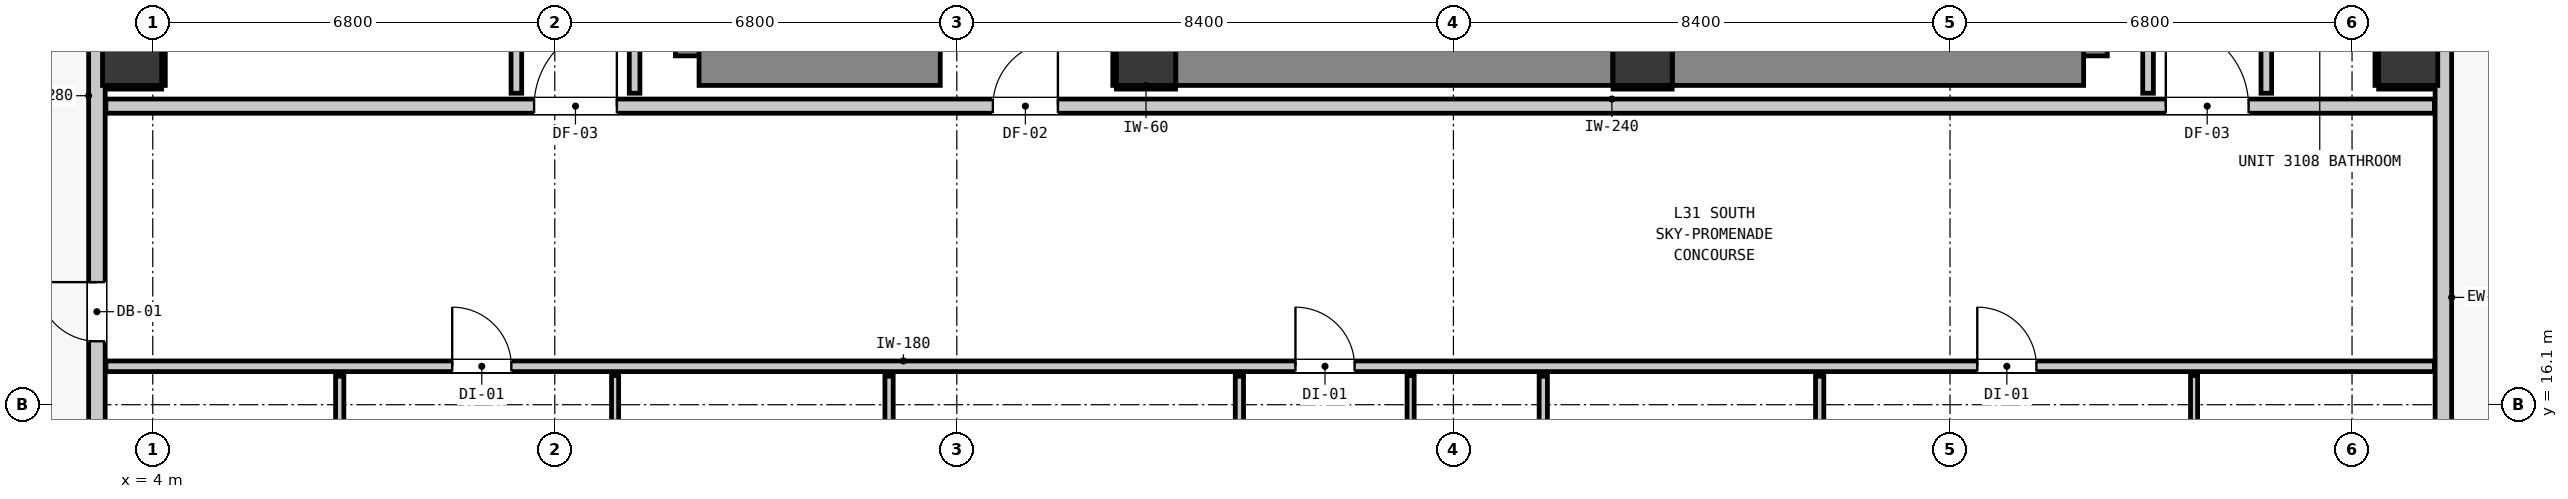
"""IFC4 building model, lengths in metres.
Left out: names, types, materials, properties, quantities, classifications, styles, units other than length and angle.
Written with IfcOpenShell. Run it as: python <this file> out.ifc"""

import sys

from ifc_helpers import new_model, si_unit, direction, frame, frame_2d, origin, origin_2d, place, context, subcontext, project, spatial, rectangle, extrude, element, fill, save


model = new_model("IFC4")
c1 = context("Model", 3, precision=1e-05, world=origin(), true_north=direction((0.0, 1.0)))
c2 = subcontext(c1, "Body", "Model", "MODEL_VIEW")
j1 = project(units=[si_unit("LENGTHUNIT", "METRE"), si_unit("PLANEANGLEUNIT", "RADIAN")], contexts=[c1])
p1 = place(None, origin())
s1 = spatial("IfcSite", under=j1, at=p1, CompositionType="ELEMENT")
p2 = place(p1, origin())
s2 = spatial("IfcBuilding", under=s1, at=p2, CompositionType="ELEMENT")
p3 = place(p2, frame((0.0, 0.0, 109.4)))
s3 = spatial("IfcBuildingStorey", under=s2, at=p3, CompositionType="ELEMENT", Elevation=109.4)
for number, where, z_axis, x_axis in (
    (1, (20.8, 22.0, 0.0), (0.0, 0.0, 1.0), (1.0, 0.0, 0.0)),
    (2, (29.2, 22.0, 0.0), (0.0, 0.0, 1.0), (1.0, 0.0, 0.0)),
):
    element("IfcColumn", number, at=place(p3, frame(where, z_axis=z_axis, x_axis=x_axis)), inside=s3, PredefinedType="COLUMN", context=c2, shape_type="SweptSolid", body=[
        extrude(rectangle(XDim=1.0, YDim=1.0, at=origin_2d()), origin(), (0.0, 0.0, 1.0), 3.32),
    ])
p4 = place(p3, frame((13.34, 22.0, 0.0), z_axis=(0.0, 0.0, 1.0), x_axis=(0.0, 1.0, 0.0)))
e3 = element("IfcWall", 3, at=p4, inside=s3, PredefinedType="SHEAR", context=c2, shape_type="SweptSolid", body=[
    extrude(rectangle(XDim=8.195, YDim=1.0, at=frame_2d((4.098, 0.0))), origin(), (0.0, 0.0, 1.0), 3.32),
])
p5 = place(p3, frame((13.24, 22.0, 0.0), z_axis=(0.0, 0.0, 1.0), x_axis=(1.0, 0.0, 0.0)))
e4 = element("IfcWall", 4, at=p5, inside=s3, PredefinedType="SHEAR", context=c2, shape_type="SweptSolid", body=[
    extrude(rectangle(XDim=4.08, YDim=1.0, at=frame_2d((2.04, 0.0))), origin(), (0.0, 0.0, 1.0), 3.32),
])
p6 = place(p3, frame((36.56, 22.0, 0.0), z_axis=(0.0, 0.0, 1.0), x_axis=(0.0, 1.0, 0.0)))
e5 = element("IfcWall", 5, at=p6, inside=s3, PredefinedType="SHEAR", context=c2, shape_type="SweptSolid", body=[
    extrude(rectangle(XDim=8.195, YDim=1.0, at=frame_2d((4.098, 0.0))), origin(), (0.0, 0.0, 1.0), 3.32),
])
p7 = place(p3, frame((29.705, 22.0, 0.0), z_axis=(0.0, 0.0, 1.0), x_axis=(1.0, 0.0, 0.0)))
e6 = element("IfcWall", 6, at=p7, inside=s3, PredefinedType="SHEAR", context=c2, shape_type="SweptSolid", body=[
    extrude(rectangle(XDim=6.955, YDim=1.0, at=frame_2d((3.478, 0.0))), origin(), (0.0, 0.0, 1.0), 3.32),
])
p8 = place(p3, frame((21.305, 22.0, 0.0), z_axis=(0.0, 0.0, 1.0), x_axis=(1.0, 0.0, 0.0)))
e7 = element("IfcWall", 7, at=p8, inside=s3, PredefinedType="SHEAR", context=c2, shape_type="SweptSolid", body=[
    extrude(rectangle(XDim=7.39, YDim=1.0, at=frame_2d((3.695, 0.0))), origin(), (0.0, 0.0, 1.0), 3.32),
])
for number, where, z_axis, x_axis in (
    (8, (3.65, 22.0, 0.0), (0.0, 0.0, 1.0), (1.0, 0.0, 0.0)),
    (9, (42.15, 22.0, 0.0), (0.0, 0.0, 1.0), (1.0, 0.0, 0.0)),
):
    element("IfcColumn", number, at=place(p3, frame(where, z_axis=z_axis, x_axis=x_axis)), inside=s3, PredefinedType="COLUMN", context=c2, shape_type="SweptSolid", body=[
        extrude(rectangle(XDim=1.0, YDim=1.0, at=origin_2d()), origin(), (0.0, 0.0, 1.0), 3.32),
    ])
p9 = place(p3, frame((3.055, 11.355, 0.0), z_axis=(0.0, 0.0, 1.0), x_axis=(0.0, 1.0, 0.0)))
e10 = element("IfcWall", 10, at=p9, inside=s3, PredefinedType="STANDARD", context=c2, shape_type="SweptSolid", body=[
    extrude(rectangle(XDim=32.29, YDim=0.28, at=frame_2d((16.145, 0.0))), origin(), (0.0, 0.0, 1.0), 3.08),
])
p10 = place(p9, frame((5.818, 0.0, 0.0)))
e11 = element("IfcOpeningElement", 11, at=p10, cuts=e10, PredefinedType="OPENING", context=c2, shape_type="SweptSolid", body=[
    extrude(rectangle(XDim=1.0, YDim=2.15, at=frame_2d((0.5, 1.075))), frame((0.0, 0.15, 0.0), z_axis=(0.0, -1.0, 0.0), x_axis=(1.0, 0.0, 0.0)), (0.0, 0.0, 1.0), 0.3),
])
p11 = place(p9, frame((0.545, 0.0, 0.85)))
e12 = element("IfcOpeningElement", 12, at=p11, cuts=e10, PredefinedType="OPENING", context=c2, shape_type="SweptSolid", body=[
    extrude(rectangle(XDim=1.05, YDim=1.65, at=frame_2d((0.525, 0.825))), frame((0.0, 0.15, 0.0), z_axis=(0.0, -1.0, 0.0), x_axis=(1.0, 0.0, 0.0)), (0.0, 0.0, 1.0), 0.3),
])
p12 = place(p9, frame((13.124, 0.0, 0.85)))
e13 = element("IfcOpeningElement", 13, at=p12, cuts=e10, PredefinedType="OPENING", context=c2, shape_type="SweptSolid", body=[
    extrude(rectangle(XDim=2.7, YDim=2.0, at=frame_2d((1.35, 1.0))), frame((0.0, 0.15, 0.0), z_axis=(0.0, -1.0, 0.0), x_axis=(1.0, 0.0, 0.0)), (0.0, 0.0, 1.0), 0.3),
])
p13 = place(p9, frame((17.188, 0.0, 0.85)))
e14 = element("IfcOpeningElement", 14, at=p13, cuts=e10, PredefinedType="OPENING", context=c2, shape_type="SweptSolid", body=[
    extrude(rectangle(XDim=1.05, YDim=1.65, at=frame_2d((0.525, 0.825))), frame((0.0, 0.15, 0.0), z_axis=(0.0, -1.0, 0.0), x_axis=(1.0, 0.0, 0.0)), (0.0, 0.0, 1.0), 0.3),
])
p14 = place(p9, frame((22.674, 0.0, 0.85)))
e15 = element("IfcOpeningElement", 15, at=p14, cuts=e10, PredefinedType="OPENING", context=c2, shape_type="SweptSolid", body=[
    extrude(rectangle(XDim=2.7, YDim=2.0, at=frame_2d((1.35, 1.0))), frame((0.0, 0.15, 0.0), z_axis=(0.0, -1.0, 0.0), x_axis=(1.0, 0.0, 0.0)), (0.0, 0.0, 1.0), 0.3),
])
p15 = place(p9, frame((26.312, 0.0, 0.85)))
e16 = element("IfcOpeningElement", 16, at=p15, cuts=e10, PredefinedType="OPENING", context=c2, shape_type="SweptSolid", body=[
    extrude(rectangle(XDim=1.05, YDim=1.65, at=frame_2d((0.525, 0.825))), frame((0.0, 0.15, 0.0), z_axis=(0.0, -1.0, 0.0), x_axis=(1.0, 0.0, 0.0)), (0.0, 0.0, 1.0), 0.3),
])
p16 = place(p3, frame((42.745, 43.645, 0.0), z_axis=(0.0, 0.0, 1.0), x_axis=(0.0, -1.0, 0.0)))
e17 = element("IfcWall", 17, at=p16, inside=s3, PredefinedType="STANDARD", context=c2, shape_type="SweptSolid", body=[
    extrude(rectangle(XDim=32.29, YDim=0.28, at=frame_2d((16.145, 0.0))), origin(), (0.0, 0.0, 1.0), 3.08),
])
p17 = place(p16, frame((6.871, 0.0, 0.0)))
e18 = element("IfcOpeningElement", 18, at=p17, cuts=e17, PredefinedType="OPENING", context=c2, shape_type="SweptSolid", body=[
    extrude(rectangle(XDim=1.0, YDim=2.15, at=frame_2d((0.5, 1.075))), frame((0.0, 0.15, 0.0), z_axis=(0.0, -1.0, 0.0), x_axis=(1.0, 0.0, 0.0)), (0.0, 0.0, 1.0), 0.3),
])
p18 = place(p16, frame((0.318, 0.0, 0.85)))
e19 = element("IfcOpeningElement", 19, at=p18, cuts=e17, PredefinedType="OPENING", context=c2, shape_type="SweptSolid", body=[
    extrude(rectangle(XDim=1.05, YDim=1.65, at=frame_2d((0.525, 0.825))), frame((0.0, 0.15, 0.0), z_axis=(0.0, -1.0, 0.0), x_axis=(1.0, 0.0, 0.0)), (0.0, 0.0, 1.0), 0.3),
])
p19 = place(p16, frame((16.37, 0.0, 0.85)))
e20 = element("IfcOpeningElement", 20, at=p19, cuts=e17, PredefinedType="OPENING", context=c2, shape_type="SweptSolid", body=[
    extrude(rectangle(XDim=2.7, YDim=2.0, at=frame_2d((1.35, 1.0))), frame((0.0, 0.15, 0.0), z_axis=(0.0, -1.0, 0.0), x_axis=(1.0, 0.0, 0.0)), (0.0, 0.0, 1.0), 0.3),
])
p20 = place(p16, frame((8.452, 0.0, 0.85)))
e21 = element("IfcOpeningElement", 21, at=p20, cuts=e17, PredefinedType="OPENING", context=c2, shape_type="SweptSolid", body=[
    extrude(rectangle(XDim=1.05, YDim=1.65, at=frame_2d((0.525, 0.825))), frame((0.0, 0.15, 0.0), z_axis=(0.0, -1.0, 0.0), x_axis=(1.0, 0.0, 0.0)), (0.0, 0.0, 1.0), 0.3),
])
p21 = place(p3, frame((3.207, 21.15, 0.0), z_axis=(0.0, 0.0, 1.0), x_axis=(1.0, 0.0, 0.0)))
e22 = element("IfcWall", 22, at=p21, inside=s3, PredefinedType="PARTITIONING", context=c2, shape_type="SweptSolid", body=[
    extrude(rectangle(XDim=39.386, YDim=0.24, at=frame_2d((19.693, 0.0))), origin(), (0.0, 0.0, 1.0), 3.08),
])
p22 = place(p21, frame((15.003, 0.0, 0.0)))
e23 = element("IfcOpeningElement", 23, at=p22, cuts=e22, PredefinedType="OPENING", context=c2, shape_type="SweptSolid", body=[
    extrude(rectangle(XDim=1.1, YDim=2.15, at=frame_2d((0.55, 1.075))), frame((0.0, 0.13, 0.0), z_axis=(0.0, -1.0, 0.0), x_axis=(1.0, 0.0, 0.0)), (0.0, 0.0, 1.0), 0.26),
])
p23 = place(p21, frame((7.243, 0.0, 0.0)))
e24 = element("IfcOpeningElement", 24, at=p23, cuts=e22, PredefinedType="OPENING", context=c2, shape_type="SweptSolid", body=[
    extrude(rectangle(XDim=1.4, YDim=2.15, at=frame_2d((0.7, 1.075))), frame((0.0, 0.13, 0.0), z_axis=(0.0, -1.0, 0.0), x_axis=(1.0, 0.0, 0.0)), (0.0, 0.0, 1.0), 0.26),
])
p24 = place(p21, frame((34.843, 0.0, 0.0)))
e25 = element("IfcOpeningElement", 25, at=p24, cuts=e22, PredefinedType="OPENING", context=c2, shape_type="SweptSolid", body=[
    extrude(rectangle(XDim=1.4, YDim=2.15, at=frame_2d((0.7, 1.075))), frame((0.0, 0.13, 0.0), z_axis=(0.0, -1.0, 0.0), x_axis=(1.0, 0.0, 0.0)), (0.0, 0.0, 1.0), 0.26),
])
p25 = place(p3, frame((3.207, 16.75, 0.0), z_axis=(0.0, 0.0, 1.0), x_axis=(1.0, 0.0, 0.0)))
e26 = element("IfcWall", 26, at=p25, inside=s3, PredefinedType="PARTITIONING", context=c2, shape_type="SweptSolid", body=[
    extrude(rectangle(XDim=39.386, YDim=0.18, at=frame_2d((19.693, 0.0))), origin(), (0.0, 0.0, 1.0), 3.08),
])
p26 = place(p25, frame((5.858, 0.0, 0.0)))
e27 = element("IfcOpeningElement", 27, at=p26, cuts=e26, PredefinedType="OPENING", context=c2, shape_type="SweptSolid", body=[
    extrude(rectangle(XDim=1.0, YDim=2.15, at=frame_2d((0.5, 1.075))), frame((0.0, 0.1, 0.0), z_axis=(0.0, -1.0, 0.0), x_axis=(1.0, 0.0, 0.0)), (0.0, 0.0, 1.0), 0.2),
])
p27 = place(p25, frame((20.121, 0.0, 0.0)))
e28 = element("IfcOpeningElement", 28, at=p27, cuts=e26, PredefinedType="OPENING", context=c2, shape_type="SweptSolid", body=[
    extrude(rectangle(XDim=1.0, YDim=2.15, at=frame_2d((0.5, 1.075))), frame((0.0, 0.1, 0.0), z_axis=(0.0, -1.0, 0.0), x_axis=(1.0, 0.0, 0.0)), (0.0, 0.0, 1.0), 0.2),
])
p28 = place(p25, frame((31.654, 0.0, 0.0)))
e29 = element("IfcOpeningElement", 29, at=p28, cuts=e26, PredefinedType="OPENING", context=c2, shape_type="SweptSolid", body=[
    extrude(rectangle(XDim=1.0, YDim=2.15, at=frame_2d((0.5, 1.075))), frame((0.0, 0.1, 0.0), z_axis=(0.0, -1.0, 0.0), x_axis=(1.0, 0.0, 0.0)), (0.0, 0.0, 1.0), 0.2),
])
p29 = place(p3, frame((10.15, 21.368, 0.0), z_axis=(0.0, 0.0, 1.0), x_axis=(0.0, 1.0, 0.0)))
e30 = element("IfcWall", 30, at=p29, inside=s3, PredefinedType="PARTITIONING", context=c2, shape_type="SweptSolid", body=[
    extrude(rectangle(XDim=2.298, YDim=0.18, at=frame_2d((1.149, 0.0))), origin(), (0.0, 0.0, 1.0), 3.08),
])
for number, where, z_axis, x_axis in (
    (31, (12.15, 21.368, 0.0), (0.0, 0.0, 1.0), (0.0, 1.0, 0.0)),
    (32, (37.75, 21.368, 0.0), (0.0, 0.0, 1.0), (0.0, 1.0, 0.0)),
):
    element("IfcWall", number, at=place(p3, frame(where, z_axis=z_axis, x_axis=x_axis)), inside=s3, PredefinedType="PARTITIONING", context=c2, shape_type="SweptSolid", body=[
        extrude(rectangle(XDim=18.694, YDim=0.18, at=frame_2d((9.347, 0.0))), origin(), (0.0, 0.0, 1.0), 3.08),
    ])
p30 = place(p3, frame((39.75, 21.368, 0.0), z_axis=(0.0, 0.0, 1.0), x_axis=(0.0, 1.0, 0.0)))
e33 = element("IfcWall", 33, at=p30, inside=s3, PredefinedType="PARTITIONING", context=c2, shape_type="SweptSolid", body=[
    extrude(rectangle(XDim=2.576, YDim=0.18, at=frame_2d((1.288, 0.0))), origin(), (0.0, 0.0, 1.0), 3.08),
])
p31 = place(p3, frame((7.162, 13.652, 0.0), z_axis=(0.0, 0.0, 1.0), x_axis=(0.0, 1.0, 0.0)))
e34 = element("IfcWall", 34, at=p31, inside=s3, PredefinedType="PARTITIONING", context=c2, shape_type="SweptSolid", body=[
    extrude(rectangle(XDim=2.93, YDim=0.14, at=frame_2d((1.465, 0.0))), origin(), (0.0, 0.0, 1.0), 3.08),
])
p32 = place(p31, frame((1.032, 0.0, 0.0)))
e35 = element("IfcOpeningElement", 35, at=p32, cuts=e34, PredefinedType="OPENING", context=c2, shape_type="SweptSolid", body=[
    extrude(rectangle(XDim=0.86, YDim=2.02, at=frame_2d((0.43, 1.01))), frame((0.0, 0.08, 0.0), z_axis=(0.0, -1.0, 0.0), x_axis=(1.0, 0.0, 0.0)), (0.0, 0.0, 1.0), 0.16),
])
p33 = place(p3, frame((16.454, 13.652, 0.0), z_axis=(0.0, 0.0, 1.0), x_axis=(0.0, 1.0, 0.0)))
e36 = element("IfcWall", 36, at=p33, inside=s3, PredefinedType="PARTITIONING", context=c2, shape_type="SweptSolid", body=[
    extrude(rectangle(XDim=2.93, YDim=0.14, at=frame_2d((1.465, 0.0))), origin(), (0.0, 0.0, 1.0), 3.08),
])
p34 = place(p3, frame((22.38, 13.652, 0.0), z_axis=(0.0, 0.0, 1.0), x_axis=(0.0, 1.0, 0.0)))
e37 = element("IfcWall", 37, at=p34, inside=s3, PredefinedType="PARTITIONING", context=c2, shape_type="SweptSolid", body=[
    extrude(rectangle(XDim=2.93, YDim=0.14, at=frame_2d((1.465, 0.0))), origin(), (0.0, 0.0, 1.0), 3.08),
])
p35 = place(p34, frame((1.032, 0.0, 0.0)))
e38 = element("IfcOpeningElement", 38, at=p35, cuts=e37, PredefinedType="OPENING", context=c2, shape_type="SweptSolid", body=[
    extrude(rectangle(XDim=0.86, YDim=2.02, at=frame_2d((0.43, 1.01))), frame((0.0, 0.08, 0.0), z_axis=(0.0, -1.0, 0.0), x_axis=(1.0, 0.0, 0.0)), (0.0, 0.0, 1.0), 0.16),
])
p36 = place(p3, frame((27.52, 13.652, 0.0), z_axis=(0.0, 0.0, 1.0), x_axis=(0.0, 1.0, 0.0)))
e39 = element("IfcWall", 39, at=p36, inside=s3, PredefinedType="PARTITIONING", context=c2, shape_type="SweptSolid", body=[
    extrude(rectangle(XDim=2.93, YDim=0.14, at=frame_2d((1.465, 0.0))), origin(), (0.0, 0.0, 1.0), 3.08),
])
p37 = place(p3, frame((32.195, 13.652, 0.0), z_axis=(0.0, 0.0, 1.0), x_axis=(0.0, 1.0, 0.0)))
e40 = element("IfcWall", 40, at=p37, inside=s3, PredefinedType="PARTITIONING", context=c2, shape_type="SweptSolid", body=[
    extrude(rectangle(XDim=2.93, YDim=0.14, at=frame_2d((1.465, 0.0))), origin(), (0.0, 0.0, 1.0), 3.08),
])
p38 = place(p37, frame((1.032, 0.0, 0.0)))
e41 = element("IfcOpeningElement", 41, at=p38, cuts=e40, PredefinedType="OPENING", context=c2, shape_type="SweptSolid", body=[
    extrude(rectangle(XDim=0.86, YDim=2.02, at=frame_2d((0.43, 1.01))), frame((0.0, 0.08, 0.0), z_axis=(0.0, -1.0, 0.0), x_axis=(1.0, 0.0, 0.0)), (0.0, 0.0, 1.0), 0.16),
])
p39 = place(p3, frame((11.82, 9.207, 0.0), z_axis=(0.0, 0.0, 1.0), x_axis=(0.0, 1.0, 0.0)))
e42 = element("IfcWall", 42, at=p39, inside=s3, PredefinedType="PARTITIONING", context=c2, shape_type="SweptSolid", body=[
    extrude(rectangle(XDim=7.385, YDim=0.12, at=frame_2d((3.692, 0.0))), origin(), (0.0, 0.0, 1.0), 3.08),
])
p40 = place(p39, frame((3.318, 0.0, 0.0)))
e43 = element("IfcOpeningElement", 43, at=p40, cuts=e42, PredefinedType="OPENING", context=c2, shape_type="SweptSolid", body=[
    extrude(rectangle(XDim=0.9, YDim=2.1, at=frame_2d((0.45, 1.05))), frame((0.0, 0.07, 0.0), z_axis=(0.0, -1.0, 0.0), x_axis=(1.0, 0.0, 0.0)), (0.0, 0.0, 1.0), 0.14),
])
p41 = place(p3, frame((25.276, 9.207, 0.0), z_axis=(0.0, 0.0, 1.0), x_axis=(0.0, 1.0, 0.0)))
e44 = element("IfcWall", 44, at=p41, inside=s3, PredefinedType="PARTITIONING", context=c2, shape_type="SweptSolid", body=[
    extrude(rectangle(XDim=7.385, YDim=0.12, at=frame_2d((3.692, 0.0))), origin(), (0.0, 0.0, 1.0), 3.08),
])
p42 = place(p41, frame((3.318, 0.0, 0.0)))
e45 = element("IfcOpeningElement", 45, at=p42, cuts=e44, PredefinedType="OPENING", context=c2, shape_type="SweptSolid", body=[
    extrude(rectangle(XDim=0.9, YDim=2.1, at=frame_2d((0.45, 1.05))), frame((0.0, 0.07, 0.0), z_axis=(0.0, -1.0, 0.0), x_axis=(1.0, 0.0, 0.0)), (0.0, 0.0, 1.0), 0.14),
])
p43 = place(p3, frame((38.528, 10.101, 0.0), z_axis=(0.0, 0.0, 1.0), x_axis=(0.0, 1.0, 0.0)))
e46 = element("IfcWall", 46, at=p43, inside=s3, PredefinedType="PARTITIONING", context=c2, shape_type="SweptSolid", body=[
    extrude(rectangle(XDim=6.491, YDim=0.12, at=frame_2d((3.246, 0.0))), origin(), (0.0, 0.0, 1.0), 2.565),
])
p44 = place(p43, frame((2.424, 0.0, 0.0)))
e47 = element("IfcOpeningElement", 47, at=p44, cuts=e46, PredefinedType="OPENING", context=c2, shape_type="SweptSolid", body=[
    extrude(rectangle(XDim=0.9, YDim=2.1, at=frame_2d((0.45, 1.05))), frame((0.0, 0.07, 0.0), z_axis=(0.0, -1.0, 0.0), x_axis=(1.0, 0.0, 0.0)), (0.0, 0.0, 1.0), 0.14),
])
for number, where, z_axis, x_axis in (
    (48, (20.3, 21.468, 0.0), (0.0, 0.0, 1.0), (1.0, 0.0, 0.0)),
    (49, (20.268, 21.5, 0.0), (0.0, 0.0, 1.0), (0.0, 1.0, 0.0)),
    (50, (28.7, 21.468, 0.0), (0.0, 0.0, 1.0), (1.0, 0.0, 0.0)),
):
    element("IfcWall", number, at=place(p3, frame(where, z_axis=z_axis, x_axis=x_axis)), inside=s3, PredefinedType="PARTITIONING", context=c2, shape_type="SweptSolid", body=[
        extrude(rectangle(XDim=1.0, YDim=0.06, at=frame_2d((0.5, 0.0))), origin(), (0.0, 0.0, 1.0), 1.45),
    ])
p45 = place(p3, frame((3.21, 21.468, 0.0), z_axis=(0.0, 0.0, 1.0), x_axis=(1.0, 0.0, 0.0)))
e51 = element("IfcWall", 51, at=p45, inside=s3, PredefinedType="PARTITIONING", context=c2, shape_type="SweptSolid", body=[
    extrude(rectangle(XDim=0.94, YDim=0.06, at=frame_2d((0.47, 0.0))), origin(), (0.0, 0.0, 1.0), 1.45),
])
p46 = place(p3, frame((4.182, 21.5, 0.0), z_axis=(0.0, 0.0, 1.0), x_axis=(0.0, 1.0, 0.0)))
e52 = element("IfcWall", 52, at=p46, inside=s3, PredefinedType="PARTITIONING", context=c2, shape_type="SweptSolid", body=[
    extrude(rectangle(XDim=1.0, YDim=0.06, at=frame_2d((0.5, 0.0))), origin(), (0.0, 0.0, 1.0), 1.45),
])
p47 = place(p3, frame((41.65, 21.468, 0.0), z_axis=(0.0, 0.0, 1.0), x_axis=(1.0, 0.0, 0.0)))
e53 = element("IfcWall", 53, at=p47, inside=s3, PredefinedType="PARTITIONING", context=c2, shape_type="SweptSolid", body=[
    extrude(rectangle(XDim=0.94, YDim=0.06, at=frame_2d((0.47, 0.0))), origin(), (0.0, 0.0, 1.0), 1.45),
])
p48 = place(p3, frame((41.618, 21.5, 0.0), z_axis=(0.0, 0.0, 1.0), x_axis=(0.0, 1.0, 0.0)))
e54 = element("IfcWall", 54, at=p48, inside=s3, PredefinedType="PARTITIONING", context=c2, shape_type="SweptSolid", body=[
    extrude(rectangle(XDim=1.0, YDim=0.06, at=frame_2d((0.5, 0.0))), origin(), (0.0, 0.0, 1.0), 1.45),
])
p49 = place(p10, origin())
e55 = element("IfcDoor", 55, at=p49, inside=s3, OperationType="SINGLE_SWING_RIGHT", PredefinedType="DOOR", context=c2, shape_type="SweptSolid", body=[
    extrude(rectangle(XDim=1.0, YDim=2.15, at=frame_2d((0.5, 1.075))), frame((0.0, 0.025, 0.0), z_axis=(0.0, -1.0, 0.0), x_axis=(1.0, 0.0, 0.0)), (0.0, 0.0, 1.0), 0.05),
])
fill(e11, e55)
p50 = place(p22, origin())
e56 = element("IfcDoor", 56, at=p50, inside=s3, OperationType="SINGLE_SWING_RIGHT", PredefinedType="DOOR", context=c2, shape_type="SweptSolid", body=[
    extrude(rectangle(XDim=1.1, YDim=2.15, at=frame_2d((0.55, 1.075))), frame((0.0, 0.025, 0.0), z_axis=(0.0, -1.0, 0.0), x_axis=(1.0, 0.0, 0.0)), (0.0, 0.0, 1.0), 0.05),
])
fill(e23, e56)
p51 = place(p23, origin())
e57 = element("IfcDoor", 57, at=p51, inside=s3, OperationType="SINGLE_SWING_RIGHT", PredefinedType="DOOR", context=c2, shape_type="SweptSolid", body=[
    extrude(rectangle(XDim=1.4, YDim=2.15, at=frame_2d((0.7, 1.075))), frame((0.0, 0.025, 0.0), z_axis=(0.0, -1.0, 0.0), x_axis=(1.0, 0.0, 0.0)), (0.0, 0.0, 1.0), 0.05),
])
fill(e24, e57)
p52 = place(p24, origin())
e58 = element("IfcDoor", 58, at=p52, inside=s3, OperationType="SINGLE_SWING_LEFT", PredefinedType="DOOR", context=c2, shape_type="SweptSolid", body=[
    extrude(rectangle(XDim=1.4, YDim=2.15, at=frame_2d((0.7, 1.075))), frame((0.0, 0.025, 0.0), z_axis=(0.0, -1.0, 0.0), x_axis=(1.0, 0.0, 0.0)), (0.0, 0.0, 1.0), 0.05),
])
fill(e25, e58)
p53 = place(p26, origin())
e59 = element("IfcDoor", 59, at=p53, inside=s3, OperationType="SINGLE_SWING_LEFT", PredefinedType="DOOR", context=c2, shape_type="SweptSolid", body=[
    extrude(rectangle(XDim=1.0, YDim=2.15, at=frame_2d((0.5, 1.075))), frame((0.0, 0.025, 0.0), z_axis=(0.0, -1.0, 0.0), x_axis=(1.0, 0.0, 0.0)), (0.0, 0.0, 1.0), 0.05),
])
fill(e27, e59)
p54 = place(p27, origin())
e60 = element("IfcDoor", 60, at=p54, inside=s3, OperationType="SINGLE_SWING_LEFT", PredefinedType="DOOR", context=c2, shape_type="SweptSolid", body=[
    extrude(rectangle(XDim=1.0, YDim=2.15, at=frame_2d((0.5, 1.075))), frame((0.0, 0.025, 0.0), z_axis=(0.0, -1.0, 0.0), x_axis=(1.0, 0.0, 0.0)), (0.0, 0.0, 1.0), 0.05),
])
fill(e28, e60)
p55 = place(p28, origin())
e61 = element("IfcDoor", 61, at=p55, inside=s3, OperationType="SINGLE_SWING_LEFT", PredefinedType="DOOR", context=c2, shape_type="SweptSolid", body=[
    extrude(rectangle(XDim=1.0, YDim=2.15, at=frame_2d((0.5, 1.075))), frame((0.0, 0.025, 0.0), z_axis=(0.0, -1.0, 0.0), x_axis=(1.0, 0.0, 0.0)), (0.0, 0.0, 1.0), 0.05),
])
fill(e29, e61)
save(model, sys.argv[1])
